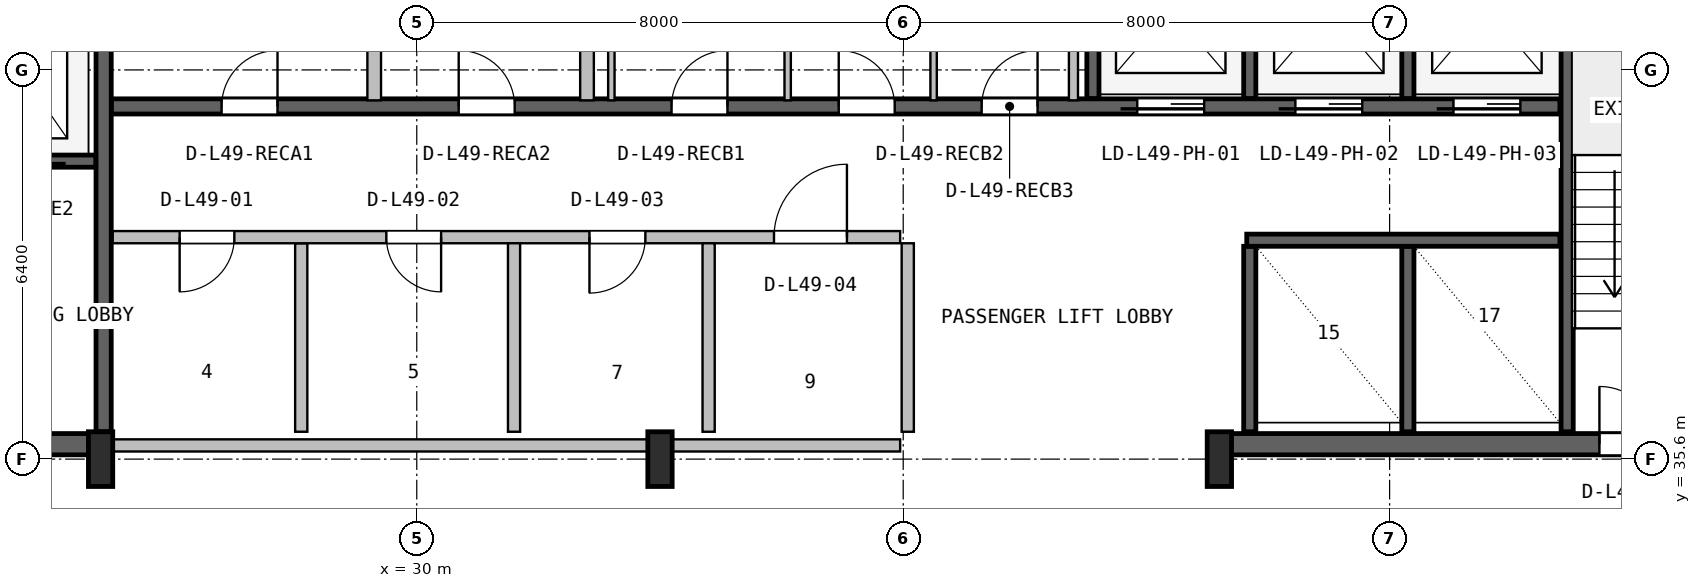
"""IFC4 building model, lengths in metres.
Left out: names, types, materials, properties, quantities, classifications, styles, units other than length and angle.
Written with IfcOpenShell. Run it as: python <this file> out.ifc"""

import sys

from ifc_helpers import new_model, si_unit, direction, frame, frame_2d, origin, origin_2d, place, context, subcontext, project, spatial, rectangle, i_section, extrude, source, transform, mapped, element, fill, save


model = new_model("IFC4")
c1 = context("Model", 3, precision=1e-05, world=origin(), true_north=direction((0.0, 1.0)))
c2 = subcontext(c1, "Body", "Model", "MODEL_VIEW")
j1 = project(units=[si_unit("LENGTHUNIT", "METRE"), si_unit("PLANEANGLEUNIT", "RADIAN")], contexts=[c1])
p1 = place(None, origin())
s1 = spatial("IfcSite", under=j1, at=p1, CompositionType="ELEMENT")
p2 = place(p1, origin())
s2 = spatial("IfcBuilding", under=s1, at=p2, CompositionType="ELEMENT")
p3 = place(p2, frame((0.0, 0.0, 199.8)))
s3 = spatial("IfcBuildingStorey", under=s2, at=p3, CompositionType="ELEMENT", Elevation=199.8)
p4 = place(p3, frame((15.67, 35.845, 0.0), z_axis=(0.0, 0.0, 1.0), x_axis=(1.0, 0.0, 0.0)))
e1 = element("IfcWall", 1, at=p4, inside=s3, PredefinedType="SHEAR", context=c2, shape_type="SweptSolid", body=[
    extrude(rectangle(XDim=9.13, YDim=0.35, at=frame_2d((4.565, 0.0))), origin(), (0.0, 0.0, 1.0), 3.55),
])
p5 = place(p4, frame((5.4, 0.0, 0.0)))
e2 = element("IfcOpeningElement", 2, at=p5, cuts=e1, PredefinedType="OPENING", context=c2, shape_type="SweptSolid", body=[
    extrude(rectangle(XDim=1.0, YDim=2.1, at=frame_2d((0.5, 1.05))), frame((0.0, 0.185, 0.0), z_axis=(0.0, -1.0, 0.0), x_axis=(1.0, 0.0, 0.0)), (0.0, 0.0, 1.0), 0.37),
])
p6 = place(p3, frame((43.2, 35.845, 0.0), z_axis=(0.0, 0.0, 1.0), x_axis=(1.0, 0.0, 0.0)))
e3 = element("IfcWall", 3, at=p6, inside=s3, PredefinedType="SHEAR", context=c2, shape_type="SweptSolid", body=[
    extrude(rectangle(XDim=9.13, YDim=0.35, at=frame_2d((4.565, 0.0))), origin(), (0.0, 0.0, 1.0), 3.55),
])
p7 = place(p6, frame((6.25, 0.0, 0.0)))
e4 = element("IfcOpeningElement", 4, at=p7, cuts=e3, PredefinedType="OPENING", context=c2, shape_type="SweptSolid", body=[
    extrude(rectangle(XDim=0.95, YDim=2.1, at=frame_2d((0.475, 1.05))), frame((0.0, 0.185, 0.0), z_axis=(0.0, -1.0, 0.0), x_axis=(1.0, 0.0, 0.0)), (0.0, 0.0, 1.0), 0.37),
])
m1 = source(origin(), c2, "Body", "SweptSolid", [
    extrude(i_section(OverallWidth=0.4, OverallDepth=0.9, WebThickness=0.016, FlangeThickness=0.028, FilletRadius=0.016, at=origin_2d()), origin(), (0.0, 0.0, 1.0), 3.8),
])
for number, where, z_axis, x_axis in (
    (5, (24.8, 35.6, 0.0), (0.0, 0.0, 1.0), (1.0, 0.0, 0.0)),
    (6, (34.0, 35.6, 0.0), (0.0, 0.0, 1.0), (1.0, 0.0, 0.0)),
    (7, (43.2, 35.6, 0.0), (0.0, 0.0, 1.0), (1.0, 0.0, 0.0)),
):
    element("IfcColumn", number, at=place(p3, frame(where, z_axis=z_axis, x_axis=x_axis)), inside=s3, PredefinedType="COLUMN", context=c2, shape_type="MappedRepresentation", body=[
        mapped(m1, transform((0.0, 0.0, 0.0), x_axis=(1.0, 0.0, 0.0), y_axis=(0.0, 1.0, 0.0), z_axis=(0.0, 0.0, 1.0), scale=1.0)),
    ])
p8 = place(p3, frame((24.85, 36.05, 0.0), z_axis=(0.0, 0.0, 1.0), x_axis=(0.0, 1.0, 0.0)))
e8 = element("IfcWall", 8, at=p8, inside=s3, PredefinedType="SHEAR", context=c2, shape_type="SweptSolid", body=[
    extrude(rectangle(XDim=10.45, YDim=0.25, at=frame_2d((5.225, 0.0))), origin(), (0.0, 0.0, 1.0), 3.55),
])
p9 = place(p3, frame((19.2, 40.5, 0.0), z_axis=(0.0, 0.0, 1.0), x_axis=(1.0, 0.0, 0.0)))
e9 = element("IfcWall", 9, at=p9, inside=s3, PredefinedType="SHEAR", context=c2, shape_type="SweptSolid", body=[
    extrude(rectangle(XDim=5.52, YDim=0.2, at=frame_2d((2.76, 0.0))), origin(), (0.0, 0.0, 1.0), 3.55),
])
p10 = place(p9, frame((1.05, 0.0, 0.0)))
e10 = element("IfcOpeningElement", 10, at=p10, cuts=e9, PredefinedType="OPENING", context=c2, shape_type="SweptSolid", body=[
    extrude(rectangle(XDim=1.1, YDim=2.18, at=frame_2d((0.55, 1.09))), frame((0.0, 0.11, 0.0), z_axis=(0.0, -1.0, 0.0), x_axis=(1.0, 0.0, 0.0)), (0.0, 0.0, 1.0), 0.22),
])
p11 = place(p9, frame((3.65, 0.0, 0.0)))
e11 = element("IfcOpeningElement", 11, at=p11, cuts=e9, PredefinedType="OPENING", context=c2, shape_type="SweptSolid", body=[
    extrude(rectangle(XDim=1.1, YDim=2.18, at=frame_2d((0.55, 1.09))), frame((0.0, 0.11, 0.0), z_axis=(0.0, -1.0, 0.0), x_axis=(1.0, 0.0, 0.0)), (0.0, 0.0, 1.0), 0.22),
])
p12 = place(p3, frame((48.92, 36.05, 0.0), z_axis=(0.0, 0.0, 1.0), x_axis=(0.0, 1.0, 0.0)))
e12 = element("IfcWall", 12, at=p12, inside=s3, PredefinedType="SHEAR", context=c2, shape_type="SweptSolid", body=[
    extrude(rectangle(XDim=10.5, YDim=0.2, at=frame_2d((5.25, 0.0))), origin(), (0.0, 0.0, 1.0), 3.55),
])
p13 = place(p3, frame((24.98, 41.4, 0.0), z_axis=(0.0, 0.0, 1.0), x_axis=(1.0, 0.0, 0.0)))
e13 = element("IfcWall", 13, at=p13, inside=s3, PredefinedType="SHEAR", context=c2, shape_type="SweptSolid", body=[
    extrude(rectangle(XDim=23.82, YDim=0.25, at=frame_2d((11.91, 0.0))), origin(), (0.0, 0.0, 1.0), 3.55),
])
p14 = place(p13, frame((16.87, 0.0, 0.0)))
e14 = element("IfcOpeningElement", 14, at=p14, cuts=e13, PredefinedType="OPENING", context=c2, shape_type="SweptSolid", body=[
    extrude(rectangle(XDim=1.1, YDim=2.18, at=frame_2d((0.55, 1.09))), frame((0.0, 0.135, 0.0), z_axis=(0.0, -1.0, 0.0), x_axis=(1.0, 0.0, 0.0)), (0.0, 0.0, 1.0), 0.27),
])
p15 = place(p13, frame((19.47, 0.0, 0.0)))
e15 = element("IfcOpeningElement", 15, at=p15, cuts=e13, PredefinedType="OPENING", context=c2, shape_type="SweptSolid", body=[
    extrude(rectangle(XDim=1.1, YDim=2.18, at=frame_2d((0.55, 1.09))), frame((0.0, 0.135, 0.0), z_axis=(0.0, -1.0, 0.0), x_axis=(1.0, 0.0, 0.0)), (0.0, 0.0, 1.0), 0.27),
])
p16 = place(p13, frame((22.07, 0.0, 0.0)))
e16 = element("IfcOpeningElement", 16, at=p16, cuts=e13, PredefinedType="OPENING", context=c2, shape_type="SweptSolid", body=[
    extrude(rectangle(XDim=1.1, YDim=2.18, at=frame_2d((0.55, 1.09))), frame((0.0, 0.135, 0.0), z_axis=(0.0, -1.0, 0.0), x_axis=(1.0, 0.0, 0.0)), (0.0, 0.0, 1.0), 0.27),
])
p17 = place(p13, frame((1.81, 0.0, 0.0)))
e17 = element("IfcOpeningElement", 17, at=p17, cuts=e13, PredefinedType="OPENING", context=c2, shape_type="SweptSolid", body=[
    extrude(rectangle(XDim=0.92, YDim=2.08, at=frame_2d((0.46, 1.04))), frame((0.0, 0.135, 0.0), z_axis=(0.0, -1.0, 0.0), x_axis=(1.0, 0.0, 0.0)), (0.0, 0.0, 1.0), 0.27),
])
p18 = place(p13, frame((5.71, 0.0, 0.0)))
e18 = element("IfcOpeningElement", 18, at=p18, cuts=e13, PredefinedType="OPENING", context=c2, shape_type="SweptSolid", body=[
    extrude(rectangle(XDim=0.92, YDim=2.08, at=frame_2d((0.46, 1.04))), frame((0.0, 0.135, 0.0), z_axis=(0.0, -1.0, 0.0), x_axis=(1.0, 0.0, 0.0)), (0.0, 0.0, 1.0), 0.27),
])
p19 = place(p13, frame((9.21, 0.0, 0.0)))
e19 = element("IfcOpeningElement", 19, at=p19, cuts=e13, PredefinedType="OPENING", context=c2, shape_type="SweptSolid", body=[
    extrude(rectangle(XDim=0.92, YDim=2.08, at=frame_2d((0.46, 1.04))), frame((0.0, 0.135, 0.0), z_axis=(0.0, -1.0, 0.0), x_axis=(1.0, 0.0, 0.0)), (0.0, 0.0, 1.0), 0.27),
])
p20 = place(p13, frame((11.96, 0.0, 0.0)))
e20 = element("IfcOpeningElement", 20, at=p20, cuts=e13, PredefinedType="OPENING", context=c2, shape_type="SweptSolid", body=[
    extrude(rectangle(XDim=0.92, YDim=2.08, at=frame_2d((0.46, 1.04))), frame((0.0, 0.135, 0.0), z_axis=(0.0, -1.0, 0.0), x_axis=(1.0, 0.0, 0.0)), (0.0, 0.0, 1.0), 0.27),
])
p21 = place(p13, frame((14.31, 0.0, 0.0)))
e21 = element("IfcOpeningElement", 21, at=p21, cuts=e13, PredefinedType="OPENING", context=c2, shape_type="SweptSolid", body=[
    extrude(rectangle(XDim=0.92, YDim=2.08, at=frame_2d((0.46, 1.04))), frame((0.0, 0.135, 0.0), z_axis=(0.0, -1.0, 0.0), x_axis=(1.0, 0.0, 0.0)), (0.0, 0.0, 1.0), 0.27),
])
p22 = place(p3, frame((41.12, 41.53, 0.0), z_axis=(0.0, 0.0, 1.0), x_axis=(0.0, 1.0, 0.0)))
e22 = element("IfcWall", 22, at=p22, inside=s3, PredefinedType="SHEAR", context=c2, shape_type="SweptSolid", body=[
    extrude(rectangle(XDim=5.02, YDim=0.2, at=frame_2d((2.51, 0.0))), origin(), (0.0, 0.0, 1.0), 3.55),
])
for number, where, z_axis, x_axis in (
    (23, (43.7, 41.53, 0.0), (0.0, 0.0, 1.0), (0.0, 1.0, 0.0)),
    (24, (46.3, 41.53, 0.0), (0.0, 0.0, 1.0), (0.0, 1.0, 0.0)),
):
    element("IfcWall", number, at=place(p3, frame(where, z_axis=z_axis, x_axis=x_axis)), inside=s3, PredefinedType="SHEAR", context=c2, shape_type="SweptSolid", body=[
        extrude(rectangle(XDim=2.87, YDim=0.2, at=frame_2d((1.435, 0.0))), origin(), (0.0, 0.0, 1.0), 3.55),
    ])
for number, where, z_axis, x_axis in (
    (25, (43.7, 36.05, 0.0), (0.0, 0.0, 1.0), (0.0, 1.0, 0.0)),
    (26, (46.3, 36.05, 0.0), (0.0, 0.0, 1.0), (0.0, 1.0, 0.0)),
):
    element("IfcWall", number, at=place(p3, frame(where, z_axis=z_axis, x_axis=x_axis)), inside=s3, PredefinedType="SHEAR", context=c2, shape_type="SweptSolid", body=[
        extrude(rectangle(XDim=3.05, YDim=0.2, at=frame_2d((1.525, 0.0))), origin(), (0.0, 0.0, 1.0), 3.55),
    ])
p23 = place(p3, frame((43.65, 39.2, 0.0), z_axis=(0.0, 0.0, 1.0), x_axis=(1.0, 0.0, 0.0)))
e27 = element("IfcWall", 27, at=p23, inside=s3, PredefinedType="SHEAR", context=c2, shape_type="SweptSolid", body=[
    extrude(rectangle(XDim=5.15, YDim=0.2, at=frame_2d((2.575, 0.0))), origin(), (0.0, 0.0, 1.0), 3.55),
])
p24 = place(p3, frame((25.0, 35.825, 0.0), z_axis=(0.0, 0.0, 1.0), x_axis=(1.0, 0.0, 0.0)))
e28 = element("IfcWall", 28, at=p24, inside=s3, PredefinedType="SOLIDWALL", context=c2, shape_type="SweptSolid", body=[
    extrude(rectangle(XDim=12.95, YDim=0.2, at=frame_2d((6.475, 0.0))), origin(), (0.0, 0.0, 1.0), 2.575),
])
p25 = place(p3, frame((28.1, 36.05, 0.0), z_axis=(0.0, 0.0, 1.0), x_axis=(0.0, 1.0, 0.0)))
e29 = element("IfcWall", 29, at=p25, inside=s3, PredefinedType="PLUMBINGWALL", context=c2, shape_type="SweptSolid", body=[
    extrude(rectangle(XDim=3.1, YDim=0.2, at=frame_2d((1.55, 0.0))), origin(), (0.0, 0.0, 1.0), 3.53),
])
p26 = place(p3, frame((25.0, 39.25, 0.0), z_axis=(0.0, 0.0, 1.0), x_axis=(1.0, 0.0, 0.0)))
e30 = element("IfcWall", 30, at=p26, inside=s3, PredefinedType="SOLIDWALL", context=c2, shape_type="SweptSolid", body=[
    extrude(rectangle(XDim=12.95, YDim=0.2, at=frame_2d((6.475, 0.0))), origin(), (0.0, 0.0, 1.0), 3.53),
])
p27 = place(p26, frame((1.1, 0.0, 0.0)))
e31 = element("IfcOpeningElement", 31, at=p27, cuts=e30, PredefinedType="OPENING", context=c2, shape_type="SweptSolid", body=[
    extrude(rectangle(XDim=0.9, YDim=2.06, at=frame_2d((0.45, 1.03))), frame((0.0, 0.11, 0.0), z_axis=(0.0, -1.0, 0.0), x_axis=(1.0, 0.0, 0.0)), (0.0, 0.0, 1.0), 0.22),
])
p28 = place(p26, frame((4.5, 0.0, 0.0)))
e32 = element("IfcOpeningElement", 32, at=p28, cuts=e30, PredefinedType="OPENING", context=c2, shape_type="SweptSolid", body=[
    extrude(rectangle(XDim=0.9, YDim=2.06, at=frame_2d((0.45, 1.03))), frame((0.0, 0.11, 0.0), z_axis=(0.0, -1.0, 0.0), x_axis=(1.0, 0.0, 0.0)), (0.0, 0.0, 1.0), 0.22),
])
p29 = place(p26, frame((7.84, 0.0, 0.0)))
e33 = element("IfcOpeningElement", 33, at=p29, cuts=e30, PredefinedType="OPENING", context=c2, shape_type="SweptSolid", body=[
    extrude(rectangle(XDim=0.92, YDim=2.08, at=frame_2d((0.46, 1.04))), frame((0.0, 0.11, 0.0), z_axis=(0.0, -1.0, 0.0), x_axis=(1.0, 0.0, 0.0)), (0.0, 0.0, 1.0), 0.22),
])
p30 = place(p26, frame((10.875, 0.0, 0.0)))
e34 = element("IfcOpeningElement", 34, at=p30, cuts=e30, PredefinedType="OPENING", context=c2, shape_type="SweptSolid", body=[
    extrude(rectangle(XDim=1.2, YDim=2.1, at=frame_2d((0.6, 1.05))), frame((0.0, 0.11, 0.0), z_axis=(0.0, -1.0, 0.0), x_axis=(1.0, 0.0, 0.0)), (0.0, 0.0, 1.0), 0.22),
])
p31 = place(p3, frame((31.6, 36.05, 0.0), z_axis=(0.0, 0.0, 1.0), x_axis=(0.0, 1.0, 0.0)))
e35 = element("IfcWall", 35, at=p31, inside=s3, PredefinedType="PLUMBINGWALL", context=c2, shape_type="SweptSolid", body=[
    extrude(rectangle(XDim=3.1, YDim=0.2, at=frame_2d((1.55, 0.0))), origin(), (0.0, 0.0, 1.0), 3.53),
])
for number, where, z_axis, x_axis in (
    (36, (34.8, 36.05, 0.0), (0.0, 0.0, 1.0), (0.0, 1.0, 0.0)),
    (37, (38.075, 36.05, 0.0), (0.0, 0.0, 1.0), (0.0, 1.0, 0.0)),
):
    element("IfcWall", number, at=place(p3, frame(where, z_axis=z_axis, x_axis=x_axis)), inside=s3, PredefinedType="SOLIDWALL", context=c2, shape_type="SweptSolid", body=[
        extrude(rectangle(XDim=3.1, YDim=0.2, at=frame_2d((1.55, 0.0))), origin(), (0.0, 0.0, 1.0), 3.53),
    ])
p32 = place(p3, frame((29.3, 41.5, 0.0), z_axis=(0.0, 0.0, 1.0), x_axis=(0.0, 1.0, 0.0)))
e38 = element("IfcWall", 38, at=p32, inside=s3, PredefinedType="PARTITIONING", context=c2, shape_type="SweptSolid", body=[
    extrude(rectangle(XDim=2.288, YDim=0.225, at=frame_2d((1.144, 0.0))), origin(), (0.0, 0.0, 1.0), 3.53),
])
p33 = place(p3, frame((32.8, 41.5, 0.0), z_axis=(0.0, 0.0, 1.0), x_axis=(0.0, 1.0, 0.0)))
e39 = element("IfcWall", 39, at=p33, inside=s3, PredefinedType="PARTITIONING", context=c2, shape_type="SweptSolid", body=[
    extrude(rectangle(XDim=5.02, YDim=0.225, at=frame_2d((2.51, 0.0))), origin(), (0.0, 0.0, 1.0), 3.53),
])
for number, where, z_axis, x_axis in (
    (40, (36.1, 41.5, 0.0), (0.0, 0.0, 1.0), (0.0, 1.0, 0.0)),
    (41, (33.2, 41.5, 0.0), (0.0, 0.0, 1.0), (0.0, 1.0, 0.0)),
    (42, (38.5, 41.5, 0.0), (0.0, 0.0, 1.0), (0.0, 1.0, 0.0)),
):
    element("IfcWall", number, at=place(p3, frame(where, z_axis=z_axis, x_axis=x_axis)), inside=s3, PredefinedType="PARTITIONING", context=c2, shape_type="SweptSolid", body=[
        extrude(rectangle(XDim=5.02, YDim=0.105, at=frame_2d((2.51, 0.0))), origin(), (0.0, 0.0, 1.0), 3.53),
    ])
p34 = place(p3, frame((40.8, 41.5, 0.0), z_axis=(0.0, 0.0, 1.0), x_axis=(0.0, 1.0, 0.0)))
e43 = element("IfcWall", 43, at=p34, inside=s3, PredefinedType="PARTITIONING", context=c2, shape_type="SweptSolid", body=[
    extrude(rectangle(XDim=5.02, YDim=0.15, at=frame_2d((2.51, 0.0))), origin(), (0.0, 0.0, 1.0), 3.53),
])
m2 = source(origin(), c2, "Body", "SweptSolid", [
    extrude(rectangle(XDim=0.95, YDim=2.1, at=frame_2d((0.475, 1.05))), frame((0.0, 0.025, 0.0), z_axis=(0.0, -1.0, 0.0), x_axis=(1.0, 0.0, 0.0)), (0.0, 0.0, 1.0), 0.05),
])
p35 = place(p7, origin())
e44 = element("IfcDoor", 44, at=p35, inside=s3, OperationType="SINGLE_SWING_LEFT", PredefinedType="DOOR", context=c2, shape_type="MappedRepresentation", body=[
    mapped(m2, transform((0.0, 0.0, 0.0), x_axis=(1.0, 0.0, 0.0), y_axis=(0.0, 1.0, 0.0), z_axis=(0.0, 0.0, 1.0), scale=1.0)),
])
fill(e4, e44)
m3 = source(origin(), c2, "Body", "SweptSolid", [
    extrude(rectangle(XDim=1.1, YDim=2.18, at=frame_2d((0.55, 1.09))), frame((0.0, 0.025, 0.0), z_axis=(0.0, -1.0, 0.0), x_axis=(1.0, 0.0, 0.0)), (0.0, 0.0, 1.0), 0.05),
])
p36 = place(p14, frame((1.1, 0.0, 0.0), z_axis=(0.0, 0.0, 1.0), x_axis=(-1.0, 0.0, 0.0)))
e45 = element("IfcDoor", 45, at=p36, inside=s3, OperationType="SLIDING_TO_LEFT", PredefinedType="DOOR", context=c2, shape_type="MappedRepresentation", body=[
    mapped(m3, transform((0.0, 0.0, 0.0), x_axis=(1.0, 0.0, 0.0), y_axis=(0.0, 1.0, 0.0), z_axis=(0.0, 0.0, 1.0), scale=1.0)),
])
fill(e14, e45)
p37 = place(p15, frame((1.1, 0.0, 0.0), z_axis=(0.0, 0.0, 1.0), x_axis=(-1.0, 0.0, 0.0)))
e46 = element("IfcDoor", 46, at=p37, inside=s3, OperationType="SLIDING_TO_LEFT", PredefinedType="DOOR", context=c2, shape_type="MappedRepresentation", body=[
    mapped(m3, transform((0.0, 0.0, 0.0), x_axis=(1.0, 0.0, 0.0), y_axis=(0.0, 1.0, 0.0), z_axis=(0.0, 0.0, 1.0), scale=1.0)),
])
fill(e15, e46)
p38 = place(p16, frame((1.1, 0.0, 0.0), z_axis=(0.0, 0.0, 1.0), x_axis=(-1.0, 0.0, 0.0)))
e47 = element("IfcDoor", 47, at=p38, inside=s3, OperationType="SLIDING_TO_LEFT", PredefinedType="DOOR", context=c2, shape_type="MappedRepresentation", body=[
    mapped(m3, transform((0.0, 0.0, 0.0), x_axis=(1.0, 0.0, 0.0), y_axis=(0.0, 1.0, 0.0), z_axis=(0.0, 0.0, 1.0), scale=1.0)),
])
fill(e16, e47)
m4 = source(origin(), c2, "Body", "SweptSolid", [
    extrude(rectangle(XDim=0.92, YDim=2.08, at=frame_2d((0.46, 1.04))), frame((0.0, 0.025, 0.0), z_axis=(0.0, -1.0, 0.0), x_axis=(1.0, 0.0, 0.0)), (0.0, 0.0, 1.0), 0.05),
])
p39 = place(p17, origin())
e48 = element("IfcDoor", 48, at=p39, inside=s3, OperationType="SINGLE_SWING_RIGHT", PredefinedType="DOOR", context=c2, shape_type="MappedRepresentation", body=[
    mapped(m4, transform((0.0, 0.0, 0.0), x_axis=(1.0, 0.0, 0.0), y_axis=(0.0, 1.0, 0.0), z_axis=(0.0, 0.0, 1.0), scale=1.0)),
])
fill(e17, e48)
p40 = place(p18, origin())
e49 = element("IfcDoor", 49, at=p40, inside=s3, OperationType="SINGLE_SWING_LEFT", PredefinedType="DOOR", context=c2, shape_type="MappedRepresentation", body=[
    mapped(m4, transform((0.0, 0.0, 0.0), x_axis=(1.0, 0.0, 0.0), y_axis=(0.0, 1.0, 0.0), z_axis=(0.0, 0.0, 1.0), scale=1.0)),
])
fill(e18, e49)
p41 = place(p19, origin())
e50 = element("IfcDoor", 50, at=p41, inside=s3, OperationType="SINGLE_SWING_RIGHT", PredefinedType="DOOR", context=c2, shape_type="MappedRepresentation", body=[
    mapped(m4, transform((0.0, 0.0, 0.0), x_axis=(1.0, 0.0, 0.0), y_axis=(0.0, 1.0, 0.0), z_axis=(0.0, 0.0, 1.0), scale=1.0)),
])
fill(e19, e50)
p42 = place(p20, origin())
e51 = element("IfcDoor", 51, at=p42, inside=s3, OperationType="SINGLE_SWING_LEFT", PredefinedType="DOOR", context=c2, shape_type="MappedRepresentation", body=[
    mapped(m4, transform((0.0, 0.0, 0.0), x_axis=(1.0, 0.0, 0.0), y_axis=(0.0, 1.0, 0.0), z_axis=(0.0, 0.0, 1.0), scale=1.0)),
])
fill(e20, e51)
p43 = place(p21, origin())
e52 = element("IfcDoor", 52, at=p43, inside=s3, OperationType="SINGLE_SWING_RIGHT", PredefinedType="DOOR", context=c2, shape_type="MappedRepresentation", body=[
    mapped(m4, transform((0.0, 0.0, 0.0), x_axis=(1.0, 0.0, 0.0), y_axis=(0.0, 1.0, 0.0), z_axis=(0.0, 0.0, 1.0), scale=1.0)),
])
fill(e21, e52)
m5 = source(origin(), c2, "Body", "SweptSolid", [
    extrude(rectangle(XDim=0.9, YDim=2.06, at=frame_2d((0.45, 1.03))), frame((0.0, 0.025, 0.0), z_axis=(0.0, -1.0, 0.0), x_axis=(1.0, 0.0, 0.0)), (0.0, 0.0, 1.0), 0.05),
])
p44 = place(p27, frame((0.9, 0.0, 0.0), z_axis=(0.0, 0.0, 1.0), x_axis=(-1.0, 0.0, 0.0)))
e53 = element("IfcDoor", 53, at=p44, inside=s3, OperationType="SINGLE_SWING_LEFT", PredefinedType="DOOR", context=c2, shape_type="MappedRepresentation", body=[
    mapped(m5, transform((0.0, 0.0, 0.0), x_axis=(1.0, 0.0, 0.0), y_axis=(0.0, 1.0, 0.0), z_axis=(0.0, 0.0, 1.0), scale=1.0)),
])
fill(e31, e53)
p45 = place(p28, frame((0.9, 0.0, 0.0), z_axis=(0.0, 0.0, 1.0), x_axis=(-1.0, 0.0, 0.0)))
e54 = element("IfcDoor", 54, at=p45, inside=s3, OperationType="SINGLE_SWING_RIGHT", PredefinedType="DOOR", context=c2, shape_type="MappedRepresentation", body=[
    mapped(m5, transform((0.0, 0.0, 0.0), x_axis=(1.0, 0.0, 0.0), y_axis=(0.0, 1.0, 0.0), z_axis=(0.0, 0.0, 1.0), scale=1.0)),
])
fill(e32, e54)
p46 = place(p29, frame((0.92, 0.0, 0.0), z_axis=(0.0, 0.0, 1.0), x_axis=(-1.0, 0.0, 0.0)))
e55 = element("IfcDoor", 55, at=p46, inside=s3, OperationType="SINGLE_SWING_LEFT", PredefinedType="DOOR", context=c2, shape_type="MappedRepresentation", body=[
    mapped(m4, transform((0.0, 0.0, 0.0), x_axis=(1.0, 0.0, 0.0), y_axis=(0.0, 1.0, 0.0), z_axis=(0.0, 0.0, 1.0), scale=1.0)),
])
fill(e33, e55)
m6 = source(origin(), c2, "Body", "SweptSolid", [
    extrude(rectangle(XDim=1.2, YDim=2.1, at=frame_2d((0.6, 1.05))), frame((0.0, 0.025, 0.0), z_axis=(0.0, -1.0, 0.0), x_axis=(1.0, 0.0, 0.0)), (0.0, 0.0, 1.0), 0.05),
])
p47 = place(p30, origin())
e56 = element("IfcDoor", 56, at=p47, inside=s3, OperationType="SINGLE_SWING_RIGHT", PredefinedType="DOOR", context=c2, shape_type="MappedRepresentation", body=[
    mapped(m6, transform((0.0, 0.0, 0.0), x_axis=(1.0, 0.0, 0.0), y_axis=(0.0, 1.0, 0.0), z_axis=(0.0, 0.0, 1.0), scale=1.0)),
])
fill(e34, e56)
save(model, sys.argv[1])
